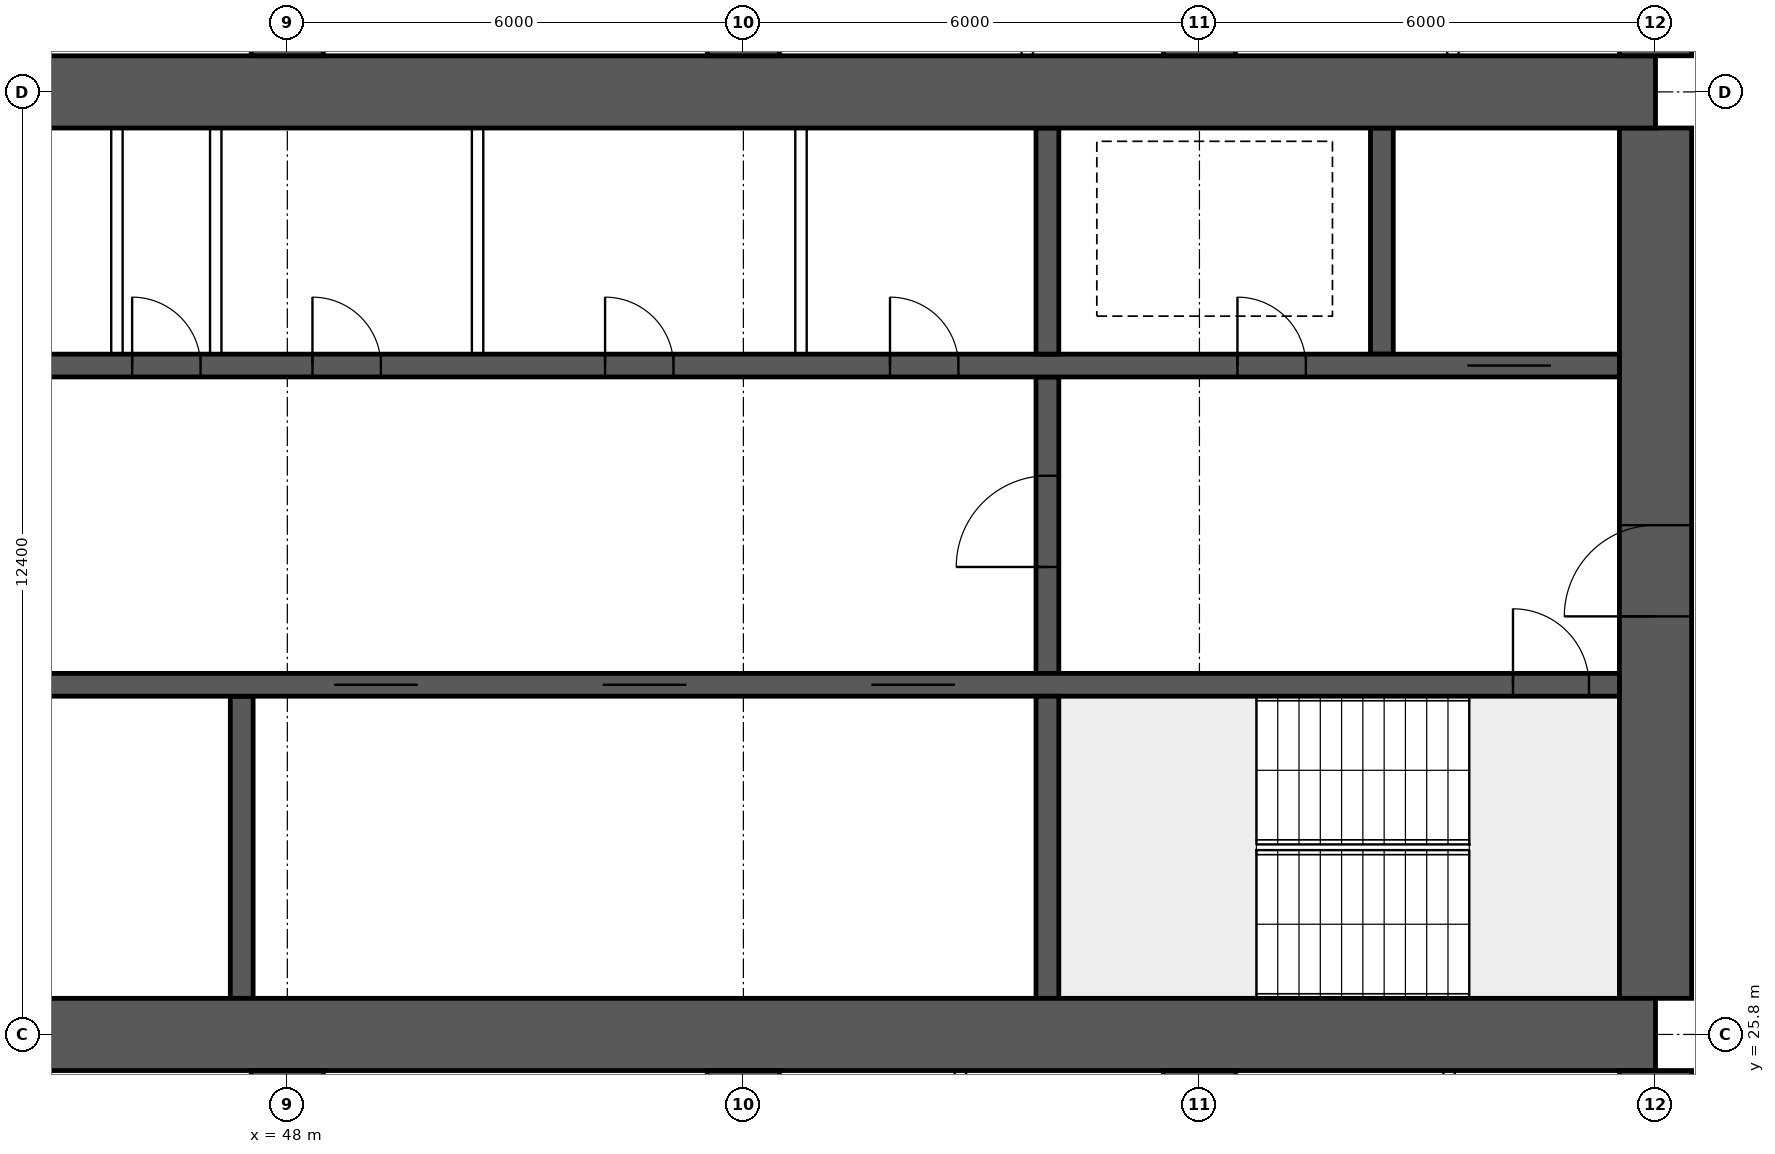
"""IFC4 building model, lengths in metres.
Left out: names, types, materials, properties, quantities, classifications, styles, units other than length and angle.
Written with IfcOpenShell. Run it as: python <this file> out.ifc"""

import sys

from ifc_helpers import new_model, si_unit, direction, frame, frame_2d, origin, place, context, subcontext, project, spatial, rectangle, extrude, element, fill, save


model = new_model("IFC4")
c1 = context("Model", 3, precision=1e-05, world=origin(), true_north=direction((0.0, 1.0)))
c2 = subcontext(c1, "Body", "Model", "MODEL_VIEW")
j1 = project(units=[si_unit("LENGTHUNIT", "METRE"), si_unit("PLANEANGLEUNIT", "RADIAN")], contexts=[c1])
p1 = place(None, origin())
s1 = spatial("IfcSite", under=j1, at=p1, CompositionType="ELEMENT")
p2 = place(p1, origin())
s2 = spatial("IfcBuilding", under=s1, at=p2, CompositionType="ELEMENT")
p3 = place(p2, frame((0.0, 0.0, 118.15)))
s3 = spatial("IfcBuildingStorey", under=s2, at=p3, CompositionType="ELEMENT", Elevation=118.15)
for number, where, z_axis, x_axis in (
    (1, (18.0, 25.8, 0.0), (0.0, 0.0, 1.0), (1.0, 0.0, 0.0)),
    (2, (18.0, 38.2, 0.0), (0.0, 0.0, 1.0), (1.0, 0.0, 0.0)),
):
    element("IfcWall", number, at=place(p3, frame(where, z_axis=z_axis, x_axis=x_axis)), inside=s3, PredefinedType="SHEAR", context=c2, shape_type="SweptSolid", body=[
        extrude(rectangle(XDim=48.0, YDim=0.95, at=frame_2d((24.0, 0.0))), origin(), (0.0, 0.0, 1.0), 3.75),
    ])
p4 = place(p3, frame((66.0, 26.275, 0.0), z_axis=(0.0, 0.0, 1.0), x_axis=(0.0, 1.0, 0.0)))
e3 = element("IfcWall", 3, at=p4, inside=s3, PredefinedType="SHEAR", context=c2, shape_type="SweptSolid", body=[
    extrude(rectangle(XDim=11.45, YDim=0.95, at=frame_2d((5.725, 0.0))), origin(), (0.0, 0.0, 1.0), 3.75),
])
p5 = place(p4, frame((5.025, 0.0, 0.0)))
e4 = element("IfcOpeningElement", 4, at=p5, cuts=e3, PredefinedType="OPENING", context=c2, shape_type="SweptSolid", body=[
    extrude(rectangle(XDim=1.2, YDim=2.1, at=frame_2d((0.6, 1.05))), frame((0.0, 0.485, 0.0), z_axis=(0.0, -1.0, 0.0), x_axis=(1.0, 0.0, 0.0)), (0.0, 0.0, 1.0), 0.97),
])
p6 = place(p3, frame((18.475, 30.4, 0.0), z_axis=(0.0, 0.0, 1.0), x_axis=(1.0, 0.0, 0.0)))
e5 = element("IfcWall", 5, at=p6, inside=s3, PredefinedType="SHEAR", context=c2, shape_type="SweptSolid", body=[
    extrude(rectangle(XDim=47.05, YDim=0.3, at=frame_2d((23.525, 0.0))), origin(), (0.0, 0.0, 1.0), 3.75),
])
p7 = place(p6, frame((0.4, 0.0, 0.0)))
e6 = element("IfcOpeningElement", 6, at=p7, cuts=e5, PredefinedType="OPENING", context=c2, shape_type="SweptSolid", body=[
    extrude(rectangle(XDim=1.0, YDim=2.1, at=frame_2d((0.5, 1.05))), frame((0.0, 0.16, 0.0), z_axis=(0.0, -1.0, 0.0), x_axis=(1.0, 0.0, 0.0)), (0.0, 0.0, 1.0), 0.32),
])
p8 = place(p6, frame((45.65, 0.0, 0.0)))
e7 = element("IfcOpeningElement", 7, at=p8, cuts=e5, PredefinedType="OPENING", context=c2, shape_type="SweptSolid", body=[
    extrude(rectangle(XDim=1.0, YDim=2.1, at=frame_2d((0.5, 1.05))), frame((0.0, 0.16, 0.0), z_axis=(0.0, -1.0, 0.0), x_axis=(1.0, 0.0, 0.0)), (0.0, 0.0, 1.0), 0.32),
])
p9 = place(p6, frame((8.275, 0.0, 0.0)))
e8 = element("IfcOpeningElement", 8, at=p9, cuts=e5, PredefinedType="OPENING", context=c2, shape_type="SweptSolid", body=[
    extrude(rectangle(XDim=1.1, YDim=2.1, at=frame_2d((0.55, 1.05))), frame((0.0, 0.16, 0.0), z_axis=(0.0, -1.0, 0.0), x_axis=(1.0, 0.0, 0.0)), (0.0, 0.0, 1.0), 0.32),
])
p10 = place(p6, frame((10.875, 0.0, 0.0)))
e9 = element("IfcOpeningElement", 9, at=p10, cuts=e5, PredefinedType="OPENING", context=c2, shape_type="SweptSolid", body=[
    extrude(rectangle(XDim=1.1, YDim=2.1, at=frame_2d((0.55, 1.05))), frame((0.0, 0.16, 0.0), z_axis=(0.0, -1.0, 0.0), x_axis=(1.0, 0.0, 0.0)), (0.0, 0.0, 1.0), 0.32),
])
p11 = place(p6, frame((13.475, 0.0, 0.0)))
e10 = element("IfcOpeningElement", 10, at=p11, cuts=e5, PredefinedType="OPENING", context=c2, shape_type="SweptSolid", body=[
    extrude(rectangle(XDim=1.1, YDim=2.1, at=frame_2d((0.55, 1.05))), frame((0.0, 0.16, 0.0), z_axis=(0.0, -1.0, 0.0), x_axis=(1.0, 0.0, 0.0)), (0.0, 0.0, 1.0), 0.32),
])
p12 = place(p6, frame((16.075, 0.0, 0.0)))
e11 = element("IfcOpeningElement", 11, at=p12, cuts=e5, PredefinedType="OPENING", context=c2, shape_type="SweptSolid", body=[
    extrude(rectangle(XDim=1.1, YDim=2.1, at=frame_2d((0.55, 1.05))), frame((0.0, 0.16, 0.0), z_axis=(0.0, -1.0, 0.0), x_axis=(1.0, 0.0, 0.0)), (0.0, 0.0, 1.0), 0.32),
])
p13 = place(p6, frame((18.85, 0.0, 0.0)))
e12 = element("IfcOpeningElement", 12, at=p13, cuts=e5, PredefinedType="OPENING", context=c2, shape_type="SweptSolid", body=[
    extrude(rectangle(XDim=0.9, YDim=2.1, at=frame_2d((0.45, 1.05))), frame((0.0, 0.16, 0.0), z_axis=(0.0, -1.0, 0.0), x_axis=(1.0, 0.0, 0.0)), (0.0, 0.0, 1.0), 0.32),
])
p14 = place(p6, frame((30.142, 0.0, 0.0)))
e13 = element("IfcOpeningElement", 13, at=p14, cuts=e5, PredefinedType="OPENING", context=c2, shape_type="SweptSolid", body=[
    extrude(rectangle(XDim=1.1, YDim=2.1, at=frame_2d((0.55, 1.05))), frame((0.0, 0.16, 0.0), z_axis=(0.0, -1.0, 0.0), x_axis=(1.0, 0.0, 0.0)), (0.0, 0.0, 1.0), 0.32),
])
p15 = place(p6, frame((33.675, 0.0, 0.0)))
e14 = element("IfcOpeningElement", 14, at=p15, cuts=e5, PredefinedType="OPENING", context=c2, shape_type="SweptSolid", body=[
    extrude(rectangle(XDim=1.1, YDim=2.1, at=frame_2d((0.55, 1.05))), frame((0.0, 0.16, 0.0), z_axis=(0.0, -1.0, 0.0), x_axis=(1.0, 0.0, 0.0)), (0.0, 0.0, 1.0), 0.32),
])
p16 = place(p6, frame((37.208, 0.0, 0.0)))
e15 = element("IfcOpeningElement", 15, at=p16, cuts=e5, PredefinedType="OPENING", context=c2, shape_type="SweptSolid", body=[
    extrude(rectangle(XDim=1.1, YDim=2.1, at=frame_2d((0.55, 1.05))), frame((0.0, 0.16, 0.0), z_axis=(0.0, -1.0, 0.0), x_axis=(1.0, 0.0, 0.0)), (0.0, 0.0, 1.0), 0.32),
])
p17 = place(p3, frame((18.475, 34.6, 0.0), z_axis=(0.0, 0.0, 1.0), x_axis=(1.0, 0.0, 0.0)))
e16 = element("IfcWall", 16, at=p17, inside=s3, PredefinedType="SHEAR", context=c2, shape_type="SweptSolid", body=[
    extrude(rectangle(XDim=47.05, YDim=0.3, at=frame_2d((23.525, 0.0))), origin(), (0.0, 0.0, 1.0), 3.75),
])
p18 = place(p17, frame((0.9, 0.0, 0.0)))
e17 = element("IfcOpeningElement", 17, at=p18, cuts=e16, PredefinedType="OPENING", context=c2, shape_type="SweptSolid", body=[
    extrude(rectangle(XDim=1.1, YDim=2.1, at=frame_2d((0.55, 1.05))), frame((0.0, 0.16, 0.0), z_axis=(0.0, -1.0, 0.0), x_axis=(1.0, 0.0, 0.0)), (0.0, 0.0, 1.0), 0.32),
])
p19 = place(p17, frame((45.05, 0.0, 0.0)))
e18 = element("IfcOpeningElement", 18, at=p19, cuts=e16, PredefinedType="OPENING", context=c2, shape_type="SweptSolid", body=[
    extrude(rectangle(XDim=1.1, YDim=2.1, at=frame_2d((0.55, 1.05))), frame((0.0, 0.16, 0.0), z_axis=(0.0, -1.0, 0.0), x_axis=(1.0, 0.0, 0.0)), (0.0, 0.0, 1.0), 0.32),
])
p20 = place(p17, frame((4.125, 0.0, 0.0)))
e19 = element("IfcOpeningElement", 19, at=p20, cuts=e16, PredefinedType="OPENING", context=c2, shape_type="SweptSolid", body=[
    extrude(rectangle(XDim=0.9, YDim=2.1, at=frame_2d((0.45, 1.05))), frame((0.0, 0.16, 0.0), z_axis=(0.0, -1.0, 0.0), x_axis=(1.0, 0.0, 0.0)), (0.0, 0.0, 1.0), 0.32),
])
p21 = place(p17, frame((42.025, 0.0, 0.0)))
e20 = element("IfcOpeningElement", 20, at=p21, cuts=e16, PredefinedType="OPENING", context=c2, shape_type="SweptSolid", body=[
    extrude(rectangle(XDim=0.9, YDim=2.1, at=frame_2d((0.45, 1.05))), frame((0.0, 0.16, 0.0), z_axis=(0.0, -1.0, 0.0), x_axis=(1.0, 0.0, 0.0)), (0.0, 0.0, 1.0), 0.32),
])
p22 = place(p17, frame((8.9, 0.0, 0.0)))
e21 = element("IfcOpeningElement", 21, at=p22, cuts=e16, PredefinedType="OPENING", context=c2, shape_type="SweptSolid", body=[
    extrude(rectangle(XDim=0.9, YDim=2.1, at=frame_2d((0.45, 1.05))), frame((0.0, 0.16, 0.0), z_axis=(0.0, -1.0, 0.0), x_axis=(1.0, 0.0, 0.0)), (0.0, 0.0, 1.0), 0.32),
])
p23 = place(p17, frame((12.874, 0.0, 0.0)))
e22 = element("IfcOpeningElement", 22, at=p23, cuts=e16, PredefinedType="OPENING", context=c2, shape_type="SweptSolid", body=[
    extrude(rectangle(XDim=0.9, YDim=2.1, at=frame_2d((0.45, 1.05))), frame((0.0, 0.16, 0.0), z_axis=(0.0, -1.0, 0.0), x_axis=(1.0, 0.0, 0.0)), (0.0, 0.0, 1.0), 0.32),
])
p24 = place(p17, frame((16.521, 0.0, 0.0)))
e23 = element("IfcOpeningElement", 23, at=p24, cuts=e16, PredefinedType="OPENING", context=c2, shape_type="SweptSolid", body=[
    extrude(rectangle(XDim=0.9, YDim=2.1, at=frame_2d((0.45, 1.05))), frame((0.0, 0.16, 0.0), z_axis=(0.0, -1.0, 0.0), x_axis=(1.0, 0.0, 0.0)), (0.0, 0.0, 1.0), 0.32),
])
p25 = place(p17, frame((20.28, 0.0, 0.0)))
e24 = element("IfcOpeningElement", 24, at=p25, cuts=e16, PredefinedType="OPENING", context=c2, shape_type="SweptSolid", body=[
    extrude(rectangle(XDim=0.9, YDim=2.1, at=frame_2d((0.45, 1.05))), frame((0.0, 0.16, 0.0), z_axis=(0.0, -1.0, 0.0), x_axis=(1.0, 0.0, 0.0)), (0.0, 0.0, 1.0), 0.32),
])
p26 = place(p17, frame((24.686, 0.0, 0.0)))
e25 = element("IfcOpeningElement", 25, at=p26, cuts=e16, PredefinedType="OPENING", context=c2, shape_type="SweptSolid", body=[
    extrude(rectangle(XDim=0.9, YDim=2.1, at=frame_2d((0.45, 1.05))), frame((0.0, 0.16, 0.0), z_axis=(0.0, -1.0, 0.0), x_axis=(1.0, 0.0, 0.0)), (0.0, 0.0, 1.0), 0.32),
])
p27 = place(p17, frame((27.483, 0.0, 0.0)))
e26 = element("IfcOpeningElement", 26, at=p27, cuts=e16, PredefinedType="OPENING", context=c2, shape_type="SweptSolid", body=[
    extrude(rectangle(XDim=0.9, YDim=2.1, at=frame_2d((0.45, 1.05))), frame((0.0, 0.16, 0.0), z_axis=(0.0, -1.0, 0.0), x_axis=(1.0, 0.0, 0.0)), (0.0, 0.0, 1.0), 0.32),
])
p28 = place(p17, frame((29.856, 0.0, 0.0)))
e27 = element("IfcOpeningElement", 27, at=p28, cuts=e16, PredefinedType="OPENING", context=c2, shape_type="SweptSolid", body=[
    extrude(rectangle(XDim=0.9, YDim=2.1, at=frame_2d((0.45, 1.05))), frame((0.0, 0.16, 0.0), z_axis=(0.0, -1.0, 0.0), x_axis=(1.0, 0.0, 0.0)), (0.0, 0.0, 1.0), 0.32),
])
p29 = place(p17, frame((33.706, 0.0, 0.0)))
e28 = element("IfcOpeningElement", 28, at=p29, cuts=e16, PredefinedType="OPENING", context=c2, shape_type="SweptSolid", body=[
    extrude(rectangle(XDim=0.9, YDim=2.1, at=frame_2d((0.45, 1.05))), frame((0.0, 0.16, 0.0), z_axis=(0.0, -1.0, 0.0), x_axis=(1.0, 0.0, 0.0)), (0.0, 0.0, 1.0), 0.32),
])
p30 = place(p17, frame((37.454, 0.0, 0.0)))
e29 = element("IfcOpeningElement", 29, at=p30, cuts=e16, PredefinedType="OPENING", context=c2, shape_type="SweptSolid", body=[
    extrude(rectangle(XDim=0.9, YDim=2.1, at=frame_2d((0.45, 1.05))), frame((0.0, 0.16, 0.0), z_axis=(0.0, -1.0, 0.0), x_axis=(1.0, 0.0, 0.0)), (0.0, 0.0, 1.0), 0.32),
])
p31 = place(p3, frame((58.0, 26.275, 0.0), z_axis=(0.0, 0.0, 1.0), x_axis=(0.0, 1.0, 0.0)))
e30 = element("IfcWall", 30, at=p31, inside=s3, PredefinedType="SHEAR", context=c2, shape_type="SweptSolid", body=[
    extrude(rectangle(XDim=3.975, YDim=0.3, at=frame_2d((1.988, 0.0))), origin(), (0.0, 0.0, 1.0), 3.75),
])
p32 = place(p3, frame((58.0, 30.55, 0.0), z_axis=(0.0, 0.0, 1.0), x_axis=(0.0, 1.0, 0.0)))
e31 = element("IfcWall", 31, at=p32, inside=s3, PredefinedType="SHEAR", context=c2, shape_type="SweptSolid", body=[
    extrude(rectangle(XDim=3.9, YDim=0.3, at=frame_2d((1.95, 0.0))), origin(), (0.0, 0.0, 1.0), 3.75),
])
p33 = place(p32, frame((1.4, 0.0, 0.0)))
e32 = element("IfcOpeningElement", 32, at=p33, cuts=e31, PredefinedType="OPENING", context=c2, shape_type="SweptSolid", body=[
    extrude(rectangle(XDim=1.2, YDim=2.1, at=frame_2d((0.6, 1.05))), frame((0.0, 0.16, 0.0), z_axis=(0.0, -1.0, 0.0), x_axis=(1.0, 0.0, 0.0)), (0.0, 0.0, 1.0), 0.32),
])
for number, where, z_axis, x_axis in (
    (33, (62.4, 34.75, 0.0), (0.0, 0.0, 1.0), (0.0, 1.0, 0.0)),
    (34, (58.0, 34.75, 0.0), (0.0, 0.0, 1.0), (0.0, 1.0, 0.0)),
):
    element("IfcWall", number, at=place(p3, frame(where, z_axis=z_axis, x_axis=x_axis)), inside=s3, PredefinedType="SHEAR", context=c2, shape_type="SweptSolid", body=[
        extrude(rectangle(XDim=2.975, YDim=0.3, at=frame_2d((1.488, 0.0))), origin(), (0.0, 0.0, 1.0), 3.75),
    ])
p34 = place(p3, frame((47.4, 26.275, 0.0), z_axis=(0.0, 0.0, 1.0), x_axis=(0.0, 1.0, 0.0)))
e35 = element("IfcWall", 35, at=p34, inside=s3, PredefinedType="SHEAR", context=c2, shape_type="SweptSolid", body=[
    extrude(rectangle(XDim=3.975, YDim=0.3, at=frame_2d((1.988, 0.0))), origin(), (0.0, 0.0, 1.0), 3.75),
])
for number, where, z_axis, x_axis in (
    (36, (48.0, 16.0, 0.0), (0.0, 0.0, 1.0), (0.0, 1.0, 0.0)),
    (37, (48.0, 38.675, 0.0), (0.0, 0.0, 1.0), (0.0, 1.0, 0.0)),
    (38, (54.0, 16.0, 0.0), (0.0, 0.0, 1.0), (0.0, 1.0, 0.0)),
    (39, (54.0, 38.675, 0.0), (0.0, 0.0, 1.0), (0.0, 1.0, 0.0)),
    (40, (60.0, 16.0, 0.0), (0.0, 0.0, 1.0), (0.0, 1.0, 0.0)),
    (41, (60.0, 38.675, 0.0), (0.0, 0.0, 1.0), (0.0, 1.0, 0.0)),
    (42, (66.0, 16.0, 0.0), (0.0, 0.0, 1.0), (0.0, 1.0, 0.0)),
    (43, (66.0, 38.675, 0.0), (0.0, 0.0, 1.0), (0.0, 1.0, 0.0)),
):
    element("IfcWall", number, at=place(p3, frame(where, z_axis=z_axis, x_axis=x_axis)), inside=s3, PredefinedType="SHEAR", context=c2, shape_type="SweptSolid", body=[
        extrude(rectangle(XDim=9.325, YDim=0.95, at=frame_2d((4.663, 0.0))), origin(), (0.0, 0.0, 1.0), 3.75),
    ])
for number, where, z_axis, x_axis in (
    (44, (45.758, 34.75, 0.0), (0.0, 0.0, 1.0), (0.0, 1.0, 0.0)),
    (45, (47.058, 34.75, 0.0), (0.0, 0.0, 1.0), (0.0, 1.0, 0.0)),
    (46, (50.503, 34.75, 0.0), (0.0, 0.0, 1.0), (0.0, 1.0, 0.0)),
    (47, (54.758, 34.75, 0.0), (0.0, 0.0, 1.0), (0.0, 1.0, 0.0)),
):
    element("IfcWall", number, at=place(p3, frame(where, z_axis=z_axis, x_axis=x_axis)), inside=s3, PredefinedType="SOLIDWALL", context=c2, shape_type="SweptSolid", body=[
        extrude(rectangle(XDim=2.975, YDim=0.15, at=frame_2d((1.488, 0.0))), origin(), (0.0, 0.0, 1.0), 3.5),
    ])
for number, where, z_axis, x_axis in (
    (48, (56.855, 16.1, 0.0), (0.0, 0.0, 1.0), (0.0, 1.0, 0.0)),
    (49, (63.285, 16.1, 0.0), (0.0, 0.0, 1.0), (0.0, 1.0, 0.0)),
    (50, (57.735, 38.675, 0.0), (0.0, 0.0, 1.0), (0.0, 1.0, 0.0)),
    (51, (63.335, 38.675, 0.0), (0.0, 0.0, 1.0), (0.0, 1.0, 0.0)),
):
    element("IfcWall", number, at=place(p3, frame(where, z_axis=z_axis, x_axis=x_axis)), inside=s3, PredefinedType="PARTITIONING", context=c2, shape_type="SweptSolid", body=[
        extrude(rectangle(XDim=9.225, YDim=0.15, at=frame_2d((4.612, 0.0))), origin(), (0.0, 0.0, 1.0), 3.5),
    ])
p35 = place(p5, origin())
e52 = element("IfcDoor", 52, at=p35, inside=s3, OperationType="SINGLE_SWING_LEFT", PredefinedType="DOOR", context=c2, shape_type="SweptSolid", body=[
    extrude(rectangle(XDim=1.2, YDim=2.1, at=frame_2d((0.6, 1.05))), frame((0.0, 0.025, 0.0), z_axis=(0.0, -1.0, 0.0), x_axis=(1.0, 0.0, 0.0)), (0.0, 0.0, 1.0), 0.05),
])
fill(e4, e52)
p36 = place(p8, origin())
e53 = element("IfcDoor", 53, at=p36, inside=s3, OperationType="SINGLE_SWING_LEFT", PredefinedType="DOOR", context=c2, shape_type="SweptSolid", body=[
    extrude(rectangle(XDim=1.0, YDim=2.1, at=frame_2d((0.5, 1.05))), frame((0.0, 0.025, 0.0), z_axis=(0.0, -1.0, 0.0), x_axis=(1.0, 0.0, 0.0)), (0.0, 0.0, 1.0), 0.05),
])
fill(e7, e53)
p37 = place(p19, origin())
e54 = element("IfcDoor", 54, at=p37, inside=s3, OperationType="DOUBLE_DOOR_SLIDING", PredefinedType="DOOR", context=c2, shape_type="SweptSolid", body=[
    extrude(rectangle(XDim=1.1, YDim=2.1, at=frame_2d((0.55, 1.05))), frame((0.0, 0.025, 0.0), z_axis=(0.0, -1.0, 0.0), x_axis=(1.0, 0.0, 0.0)), (0.0, 0.0, 1.0), 0.05),
])
fill(e18, e54)
p38 = place(p21, origin())
e55 = element("IfcDoor", 55, at=p38, inside=s3, OperationType="SINGLE_SWING_LEFT", PredefinedType="DOOR", context=c2, shape_type="SweptSolid", body=[
    extrude(rectangle(XDim=0.9, YDim=2.1, at=frame_2d((0.45, 1.05))), frame((0.0, 0.025, 0.0), z_axis=(0.0, -1.0, 0.0), x_axis=(1.0, 0.0, 0.0)), (0.0, 0.0, 1.0), 0.05),
])
fill(e20, e55)
p39 = place(p33, origin())
e56 = element("IfcDoor", 56, at=p39, inside=s3, OperationType="SINGLE_SWING_LEFT", PredefinedType="DOOR", context=c2, shape_type="SweptSolid", body=[
    extrude(rectangle(XDim=1.2, YDim=2.1, at=frame_2d((0.6, 1.05))), frame((0.0, 0.025, 0.0), z_axis=(0.0, -1.0, 0.0), x_axis=(1.0, 0.0, 0.0)), (0.0, 0.0, 1.0), 0.05),
])
fill(e32, e56)
p40 = place(p27, origin())
e57 = element("IfcDoor", 57, at=p40, inside=s3, OperationType="SINGLE_SWING_LEFT", PredefinedType="DOOR", context=c2, shape_type="SweptSolid", body=[
    extrude(rectangle(XDim=0.9, YDim=2.1, at=frame_2d((0.45, 1.05))), frame((0.0, 0.025, 0.0), z_axis=(0.0, -1.0, 0.0), x_axis=(1.0, 0.0, 0.0)), (0.0, 0.0, 1.0), 0.05),
])
fill(e26, e57)
p41 = place(p28, origin())
e58 = element("IfcDoor", 58, at=p41, inside=s3, OperationType="SINGLE_SWING_LEFT", PredefinedType="DOOR", context=c2, shape_type="SweptSolid", body=[
    extrude(rectangle(XDim=0.9, YDim=2.1, at=frame_2d((0.45, 1.05))), frame((0.0, 0.025, 0.0), z_axis=(0.0, -1.0, 0.0), x_axis=(1.0, 0.0, 0.0)), (0.0, 0.0, 1.0), 0.05),
])
fill(e27, e58)
p42 = place(p29, origin())
e59 = element("IfcDoor", 59, at=p42, inside=s3, OperationType="SINGLE_SWING_LEFT", PredefinedType="DOOR", context=c2, shape_type="SweptSolid", body=[
    extrude(rectangle(XDim=0.9, YDim=2.1, at=frame_2d((0.45, 1.05))), frame((0.0, 0.025, 0.0), z_axis=(0.0, -1.0, 0.0), x_axis=(1.0, 0.0, 0.0)), (0.0, 0.0, 1.0), 0.05),
])
fill(e28, e59)
p43 = place(p30, origin())
e60 = element("IfcDoor", 60, at=p43, inside=s3, OperationType="SINGLE_SWING_LEFT", PredefinedType="DOOR", context=c2, shape_type="SweptSolid", body=[
    extrude(rectangle(XDim=0.9, YDim=2.1, at=frame_2d((0.45, 1.05))), frame((0.0, 0.025, 0.0), z_axis=(0.0, -1.0, 0.0), x_axis=(1.0, 0.0, 0.0)), (0.0, 0.0, 1.0), 0.05),
])
fill(e29, e60)
p44 = place(p14, origin())
e61 = element("IfcDoor", 61, at=p44, inside=s3, OperationType="DOUBLE_DOOR_SLIDING", PredefinedType="DOOR", context=c2, shape_type="SweptSolid", body=[
    extrude(rectangle(XDim=1.1, YDim=2.1, at=frame_2d((0.55, 1.05))), frame((0.0, 0.025, 0.0), z_axis=(0.0, -1.0, 0.0), x_axis=(1.0, 0.0, 0.0)), (0.0, 0.0, 1.0), 0.05),
])
fill(e13, e61)
p45 = place(p15, origin())
e62 = element("IfcDoor", 62, at=p45, inside=s3, OperationType="DOUBLE_DOOR_SLIDING", PredefinedType="DOOR", context=c2, shape_type="SweptSolid", body=[
    extrude(rectangle(XDim=1.1, YDim=2.1, at=frame_2d((0.55, 1.05))), frame((0.0, 0.025, 0.0), z_axis=(0.0, -1.0, 0.0), x_axis=(1.0, 0.0, 0.0)), (0.0, 0.0, 1.0), 0.05),
])
fill(e14, e62)
p46 = place(p16, origin())
e63 = element("IfcDoor", 63, at=p46, inside=s3, OperationType="DOUBLE_DOOR_SLIDING", PredefinedType="DOOR", context=c2, shape_type="SweptSolid", body=[
    extrude(rectangle(XDim=1.1, YDim=2.1, at=frame_2d((0.55, 1.05))), frame((0.0, 0.025, 0.0), z_axis=(0.0, -1.0, 0.0), x_axis=(1.0, 0.0, 0.0)), (0.0, 0.0, 1.0), 0.05),
])
fill(e15, e63)
save(model, sys.argv[1])
